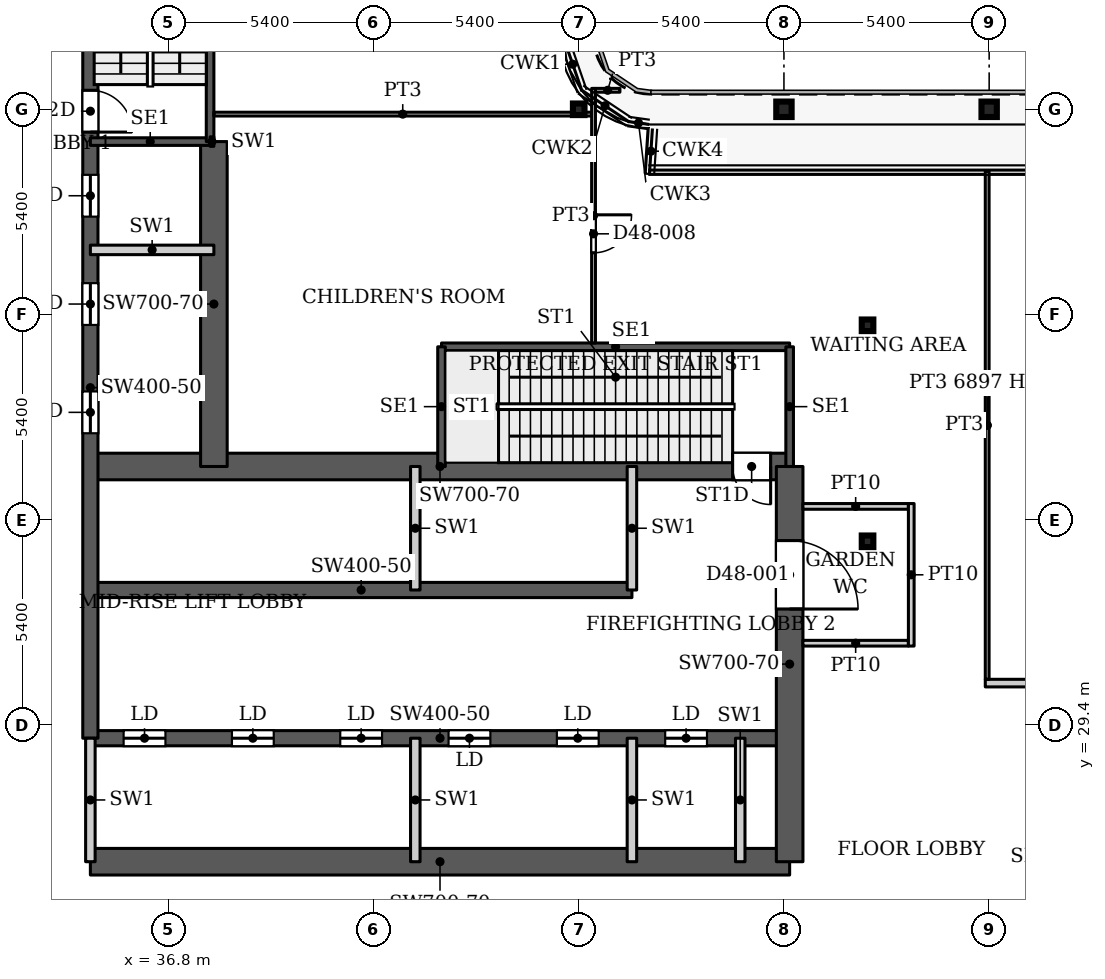
"""IFC4 building model, lengths in metres.
Left out: names, types, materials, properties, quantities, classifications, styles, units other than length and angle.
Written with IfcOpenShell. Run it as: python <this file> out.ifc"""

import sys

from ifc_helpers import new_model, si_unit, direction, frame, frame_2d, origin, origin_2d, place, context, subcontext, project, spatial, rectangle, hollow_rectangle, i_section, extrude, source, transform, mapped, element, fill, save


model = new_model("IFC4")
c1 = context("Model", 3, precision=1e-05, world=origin(), true_north=direction((0.0, 1.0)))
c2 = subcontext(c1, "Body", "Model", "MODEL_VIEW")
j1 = project(units=[si_unit("LENGTHUNIT", "METRE"), si_unit("PLANEANGLEUNIT", "RADIAN")], contexts=[c1])
p1 = place(None, origin())
s1 = spatial("IfcSite", under=j1, at=p1, CompositionType="ELEMENT")
p2 = place(p1, origin())
s2 = spatial("IfcBuilding", under=s1, at=p2, CompositionType="ELEMENT")
p3 = place(p2, frame((0.0, 0.0, 203.3)))
s3 = spatial("IfcBuildingStorey", under=s2, at=p3, CompositionType="ELEMENT", Elevation=203.3)
for number, where, z_axis, x_axis in (
    (1, (53.0, 45.6, 0.0), (0.0, 0.0, 1.0), (1.0, 0.0, 0.0)),
    (2, (58.4, 45.6, 0.0), (0.0, 0.0, 1.0), (1.0, 0.0, 0.0)),
):
    element("IfcColumn", number, at=place(p3, frame(where, z_axis=z_axis, x_axis=x_axis)), inside=s3, PredefinedType="COLUMN", context=c2, shape_type="SweptSolid", body=[
        extrude(i_section(OverallWidth=0.404, OverallDepth=0.407, WebThickness=0.027, FlangeThickness=0.044, FilletRadius=0.012, at=origin_2d()), origin(), (0.0, 0.0, 1.0), 7.8),
    ])
for number, where, z_axis, x_axis in (
    (3, (55.2, 34.232, 0.0), (0.0, 0.0, 1.0), (1.0, 0.0, 0.0)),
    (4, (55.2, 39.916, 0.0), (0.0, 0.0, 1.0), (1.0, 0.0, 0.0)),
    (5, (47.6, 45.6, 0.0), (0.0, 0.0, 1.0), (1.0, 0.0, 0.0)),
):
    element("IfcColumn", number, at=place(p3, frame(where, z_axis=z_axis, x_axis=x_axis)), inside=s3, PredefinedType="COLUMN", context=c2, shape_type="SweptSolid", body=[
        extrude(hollow_rectangle(XDim=0.305, YDim=0.305, WallThickness=0.016, InnerFilletRadius=0.016, OuterFilletRadius=0.032, at=origin_2d()), origin(), (0.0, 0.0, 1.0), 7.8),
    ])
p4 = place(p3, frame((34.75, 25.8, 0.0), z_axis=(0.0, 0.0, 1.0), x_axis=(1.0, 0.0, 0.0)))
e6 = element("IfcWall", 6, at=p4, inside=s3, PredefinedType="SHEAR", context=c2, shape_type="SweptSolid", body=[
    extrude(rectangle(XDim=18.4, YDim=0.7, at=frame_2d((9.2, 0.0))), origin(), (0.0, 0.0, 1.0), 7.8),
])
p5 = place(p3, frame((34.75, 29.05, 0.0), z_axis=(0.0, 0.0, 1.0), x_axis=(1.0, 0.0, 0.0)))
e7 = element("IfcWall", 7, at=p5, inside=s3, PredefinedType="SHEAR", context=c2, shape_type="SweptSolid", body=[
    extrude(rectangle(XDim=18.4, YDim=0.4, at=frame_2d((9.2, 0.0))), origin(), (0.0, 0.0, 1.0), 7.8),
])
p6 = place(p5, frame((0.875, 0.0, 0.0)))
e8 = element("IfcOpeningElement", 8, at=p6, cuts=e7, PredefinedType="OPENING", context=c2, shape_type="SweptSolid", body=[
    extrude(rectangle(XDim=1.1, YDim=2.2, at=frame_2d((0.55, 1.1))), frame((0.0, 0.21, 0.0), z_axis=(0.0, -1.0, 0.0), x_axis=(1.0, 0.0, 0.0)), (0.0, 0.0, 1.0), 0.42),
])
p7 = place(p5, frame((3.725, 0.0, 0.0)))
e9 = element("IfcOpeningElement", 9, at=p7, cuts=e7, PredefinedType="OPENING", context=c2, shape_type="SweptSolid", body=[
    extrude(rectangle(XDim=1.1, YDim=2.2, at=frame_2d((0.55, 1.1))), frame((0.0, 0.21, 0.0), z_axis=(0.0, -1.0, 0.0), x_axis=(1.0, 0.0, 0.0)), (0.0, 0.0, 1.0), 0.42),
])
p8 = place(p5, frame((6.575, 0.0, 0.0)))
e10 = element("IfcOpeningElement", 10, at=p8, cuts=e7, PredefinedType="OPENING", context=c2, shape_type="SweptSolid", body=[
    extrude(rectangle(XDim=1.1, YDim=2.2, at=frame_2d((0.55, 1.1))), frame((0.0, 0.21, 0.0), z_axis=(0.0, -1.0, 0.0), x_axis=(1.0, 0.0, 0.0)), (0.0, 0.0, 1.0), 0.42),
])
p9 = place(p5, frame((9.425, 0.0, 0.0)))
e11 = element("IfcOpeningElement", 11, at=p9, cuts=e7, PredefinedType="OPENING", context=c2, shape_type="SweptSolid", body=[
    extrude(rectangle(XDim=1.1, YDim=2.2, at=frame_2d((0.55, 1.1))), frame((0.0, 0.21, 0.0), z_axis=(0.0, -1.0, 0.0), x_axis=(1.0, 0.0, 0.0)), (0.0, 0.0, 1.0), 0.42),
])
p10 = place(p5, frame((12.275, 0.0, 0.0)))
e12 = element("IfcOpeningElement", 12, at=p10, cuts=e7, PredefinedType="OPENING", context=c2, shape_type="SweptSolid", body=[
    extrude(rectangle(XDim=1.1, YDim=2.2, at=frame_2d((0.55, 1.1))), frame((0.0, 0.21, 0.0), z_axis=(0.0, -1.0, 0.0), x_axis=(1.0, 0.0, 0.0)), (0.0, 0.0, 1.0), 0.42),
])
p11 = place(p5, frame((15.125, 0.0, 0.0)))
e13 = element("IfcOpeningElement", 13, at=p11, cuts=e7, PredefinedType="OPENING", context=c2, shape_type="SweptSolid", body=[
    extrude(rectangle(XDim=1.1, YDim=2.2, at=frame_2d((0.55, 1.1))), frame((0.0, 0.21, 0.0), z_axis=(0.0, -1.0, 0.0), x_axis=(1.0, 0.0, 0.0)), (0.0, 0.0, 1.0), 0.42),
])
p12 = place(p3, frame((34.75, 32.95, 0.0), z_axis=(0.0, 0.0, 1.0), x_axis=(1.0, 0.0, 0.0)))
e14 = element("IfcWall", 14, at=p12, inside=s3, PredefinedType="SHEAR", context=c2, shape_type="SweptSolid", body=[
    extrude(rectangle(XDim=14.25, YDim=0.4, at=frame_2d((7.125, 0.0))), origin(), (0.0, 0.0, 1.0), 7.8),
])
p13 = place(p3, frame((34.75, 36.2, 0.0), z_axis=(0.0, 0.0, 1.0), x_axis=(1.0, 0.0, 0.0)))
e15 = element("IfcWall", 15, at=p13, inside=s3, PredefinedType="SHEAR", context=c2, shape_type="SweptSolid", body=[
    extrude(rectangle(XDim=18.4, YDim=0.7, at=frame_2d((9.2, 0.0))), origin(), (0.0, 0.0, 1.0), 7.8),
])
p14 = place(p13, frame((16.9, 0.0, 0.0)))
e16 = element("IfcOpeningElement", 16, at=p14, cuts=e15, PredefinedType="OPENING", context=c2, shape_type="SweptSolid", body=[
    extrude(rectangle(XDim=1.0, YDim=2.2, at=frame_2d((0.5, 1.1))), frame((0.0, 0.36, 0.0), z_axis=(0.0, -1.0, 0.0), x_axis=(1.0, 0.0, 0.0)), (0.0, 0.0, 1.0), 0.72),
])
p15 = place(p3, frame((34.75, 29.05, 0.0), z_axis=(0.0, 0.0, 1.0), x_axis=(0.0, 1.0, 0.0)))
e17 = element("IfcWall", 17, at=p15, inside=s3, PredefinedType="SHEAR", context=c2, shape_type="SweptSolid", body=[
    extrude(rectangle(XDim=18.45, YDim=0.4, at=frame_2d((9.225, 0.0))), origin(), (0.0, 0.0, 1.0), 7.8),
])
p16 = place(p15, frame((8.025, 0.0, 0.0)))
e18 = element("IfcOpeningElement", 18, at=p16, cuts=e17, PredefinedType="OPENING", context=c2, shape_type="SweptSolid", body=[
    extrude(rectangle(XDim=1.1, YDim=2.2, at=frame_2d((0.55, 1.1))), frame((0.0, 0.21, 0.0), z_axis=(0.0, -1.0, 0.0), x_axis=(1.0, 0.0, 0.0)), (0.0, 0.0, 1.0), 0.42),
])
p17 = place(p15, frame((10.875, 0.0, 0.0)))
e19 = element("IfcOpeningElement", 19, at=p17, cuts=e17, PredefinedType="OPENING", context=c2, shape_type="SweptSolid", body=[
    extrude(rectangle(XDim=1.1, YDim=2.2, at=frame_2d((0.55, 1.1))), frame((0.0, 0.21, 0.0), z_axis=(0.0, -1.0, 0.0), x_axis=(1.0, 0.0, 0.0)), (0.0, 0.0, 1.0), 0.42),
])
p18 = place(p15, frame((13.725, 0.0, 0.0)))
e20 = element("IfcOpeningElement", 20, at=p18, cuts=e17, PredefinedType="OPENING", context=c2, shape_type="SweptSolid", body=[
    extrude(rectangle(XDim=1.1, YDim=2.2, at=frame_2d((0.55, 1.1))), frame((0.0, 0.21, 0.0), z_axis=(0.0, -1.0, 0.0), x_axis=(1.0, 0.0, 0.0)), (0.0, 0.0, 1.0), 0.42),
])
p19 = place(p15, frame((15.95, 0.0, 0.0)))
e21 = element("IfcOpeningElement", 21, at=p19, cuts=e17, PredefinedType="OPENING", context=c2, shape_type="SweptSolid", body=[
    extrude(rectangle(XDim=1.1, YDim=2.2, at=frame_2d((0.55, 1.1))), frame((0.0, 0.21, 0.0), z_axis=(0.0, -1.0, 0.0), x_axis=(1.0, 0.0, 0.0)), (0.0, 0.0, 1.0), 0.42),
])
p20 = place(p3, frame((38.0, 36.2, 0.0), z_axis=(0.0, 0.0, 1.0), x_axis=(0.0, 1.0, 0.0)))
e22 = element("IfcWall", 22, at=p20, inside=s3, PredefinedType="SHEAR", context=c2, shape_type="SweptSolid", body=[
    extrude(rectangle(XDim=8.55, YDim=0.7, at=frame_2d((4.275, 0.0))), origin(), (0.0, 0.0, 1.0), 7.8),
])
p21 = place(p3, frame((53.15, 25.8, 0.0), z_axis=(0.0, 0.0, 1.0), x_axis=(0.0, 1.0, 0.0)))
e23 = element("IfcWall", 23, at=p21, inside=s3, PredefinedType="SHEAR", context=c2, shape_type="SweptSolid", body=[
    extrude(rectangle(XDim=10.4, YDim=0.7, at=frame_2d((5.2, 0.0))), origin(), (0.0, 0.0, 1.0), 7.8),
])
p22 = place(p21, frame((6.65, 0.0, 0.0)))
e24 = element("IfcOpeningElement", 24, at=p22, cuts=e23, PredefinedType="OPENING", context=c2, shape_type="SweptSolid", body=[
    extrude(rectangle(XDim=1.8, YDim=2.1, at=frame_2d((0.9, 1.05))), frame((0.0, 0.36, 0.0), z_axis=(0.0, -1.0, 0.0), x_axis=(1.0, 0.0, 0.0)), (0.0, 0.0, 1.0), 0.72),
])
p23 = place(p3, frame((43.99, 39.35, 0.0), z_axis=(0.0, 0.0, 1.0), x_axis=(1.0, 0.0, 0.0)))
e25 = element("IfcWall", 25, at=p23, inside=s3, PredefinedType="SHEAR", context=c2, shape_type="SweptSolid", body=[
    extrude(rectangle(XDim=9.16, YDim=0.2, at=frame_2d((4.58, 0.0))), origin(), (0.0, 0.0, 1.0), 7.8),
])
for number, where, z_axis, x_axis in (
    (26, (43.99, 36.2, 0.0), (0.0, 0.0, 1.0), (0.0, 1.0, 0.0)),
    (27, (53.15, 36.2, 0.0), (0.0, 0.0, 1.0), (0.0, 1.0, 0.0)),
):
    element("IfcWall", number, at=place(p3, frame(where, z_axis=z_axis, x_axis=x_axis)), inside=s3, PredefinedType="SHEAR", context=c2, shape_type="SweptSolid", body=[
        extrude(rectangle(XDim=3.15, YDim=0.2, at=frame_2d((1.575, 0.0))), origin(), (0.0, 0.0, 1.0), 7.8),
    ])
p24 = place(p3, frame((34.75, 44.75, 0.0), z_axis=(0.0, 0.0, 1.0), x_axis=(1.0, 0.0, 0.0)))
e28 = element("IfcWall", 28, at=p24, inside=s3, PredefinedType="SHEAR", context=c2, shape_type="SweptSolid", body=[
    extrude(rectangle(XDim=3.15, YDim=0.2, at=frame_2d((1.575, 0.0))), origin(), (0.0, 0.0, 1.0), 7.8),
])
p25 = place(p3, frame((37.9, 44.75, 0.0), z_axis=(0.0, 0.0, 1.0), x_axis=(0.0, 1.0, 0.0)))
e29 = element("IfcWall", 29, at=p25, inside=s3, PredefinedType="SHEAR", context=c2, shape_type="SweptSolid", body=[
    extrude(rectangle(XDim=9.16, YDim=0.2, at=frame_2d((4.58, 0.0))), origin(), (0.0, 0.0, 1.0), 7.8),
])
for number, where, z_axis, x_axis in (
    (30, (34.75, 25.8, 0.0), (0.0, 0.0, 1.0), (0.0, 1.0, 0.0)),
    (31, (43.3, 25.8, 0.0), (0.0, 0.0, 1.0), (0.0, 1.0, 0.0)),
    (32, (43.3, 32.95, 0.0), (0.0, 0.0, 1.0), (0.0, 1.0, 0.0)),
    (33, (49.0, 25.8, 0.0), (0.0, 0.0, 1.0), (0.0, 1.0, 0.0)),
    (34, (49.0, 32.95, 0.0), (0.0, 0.0, 1.0), (0.0, 1.0, 0.0)),
    (35, (51.85, 25.8, 0.0), (0.0, 0.0, 1.0), (0.0, 1.0, 0.0)),
    (36, (34.75, 41.9, 0.0), (0.0, 0.0, 1.0), (1.0, 0.0, 0.0)),
):
    element("IfcWall", number, at=place(p3, frame(where, z_axis=z_axis, x_axis=x_axis)), inside=s3, PredefinedType="PARTITIONING", context=c2, shape_type="SweptSolid", body=[
        extrude(rectangle(XDim=3.25, YDim=0.25, at=frame_2d((1.625, 0.0))), origin(), (0.0, 0.0, 1.0), 7.8),
    ])
p26 = place(p3, frame((37.9, 44.75, 0.0), z_axis=(0.0, 0.0, 1.0), x_axis=(1.0, 0.0, 0.0)))
e37 = element("IfcWall", 37, at=p26, inside=s3, PredefinedType="PARTITIONING", context=c2, shape_type="SweptSolid", body=[
    extrude(rectangle(XDim=0.1, YDim=0.25, at=frame_2d((0.05, 0.0))), origin(), (0.0, 0.0, 1.0), 7.8),
])
p27 = place(p3, frame((37.999, 45.473, 0.0), z_axis=(0.0, 0.0, 1.0), x_axis=(1.0, 0.0, 0.0)))
e38 = element("IfcWall", 38, at=p27, inside=s3, PredefinedType="PARTITIONING", context=c2, shape_type="SweptSolid", body=[
    extrude(rectangle(XDim=9.941, YDim=0.1, at=frame_2d((4.97, 0.0))), origin(), (0.0, 0.0, 1.0), 7.5),
])
p28 = place(p3, frame((47.99, 39.449, 0.0), z_axis=(0.0, 0.0, 1.0), x_axis=(0.0, 1.0, 0.0)))
e39 = element("IfcWall", 39, at=p28, inside=s3, PredefinedType="PARTITIONING", context=c2, shape_type="SweptSolid", body=[
    extrude(rectangle(XDim=6.701, YDim=0.1, at=frame_2d((3.351, 0.0))), origin(), (0.0, 0.0, 1.0), 7.5),
])
p29 = place(p28, frame((2.374, 0.0, 0.0)))
e40 = element("IfcOpeningElement", 40, at=p29, cuts=e39, PredefinedType="OPENING", context=c2, shape_type="SweptSolid", body=[
    extrude(rectangle(XDim=1.0, YDim=2.1, at=frame_2d((0.5, 1.05))), frame((0.0, 0.06, 0.0), z_axis=(0.0, -1.0, 0.0), x_axis=(1.0, 0.0, 0.0)), (0.0, 0.0, 1.0), 0.12),
])
p30 = place(p3, frame((48.04, 46.1, 0.0), z_axis=(0.0, 0.0, 1.0), x_axis=(1.0, 0.0, 0.0)))
e41 = element("IfcWall", 41, at=p30, inside=s3, PredefinedType="PARTITIONING", context=c2, shape_type="SweptSolid", body=[
    extrude(rectangle(XDim=0.644, YDim=0.1, at=frame_2d((0.322, 0.0))), origin(), (0.0, 0.0, 1.0), 7.5),
])
for number, where, z_axis, x_axis in (
    (42, (53.499, 31.55, 0.0), (0.0, 0.0, 1.0), (1.0, 0.0, 0.0)),
    (43, (53.499, 35.15, 0.0), (0.0, 0.0, 1.0), (1.0, 0.0, 0.0)),
):
    element("IfcWall", number, at=place(p3, frame(where, z_axis=z_axis, x_axis=x_axis)), inside=s3, PredefinedType="PARTITIONING", context=c2, shape_type="SweptSolid", body=[
        extrude(rectangle(XDim=2.776, YDim=0.15, at=frame_2d((1.388, 0.0))), origin(), (0.0, 0.0, 1.0), 7.5),
    ])
p31 = place(p3, frame((56.35, 31.475, 0.0), z_axis=(0.0, 0.0, 1.0), x_axis=(0.0, 1.0, 0.0)))
e44 = element("IfcWall", 44, at=p31, inside=s3, PredefinedType="PARTITIONING", context=c2, shape_type="SweptSolid", body=[
    extrude(rectangle(XDim=3.75, YDim=0.15, at=frame_2d((1.875, 0.0))), origin(), (0.0, 0.0, 1.0), 7.5),
])
p32 = place(p3, frame((58.298, 30.5, 0.0), z_axis=(0.0, 0.0, 1.0), x_axis=(1.0, 0.0, 0.0)))
e45 = element("IfcWall", 45, at=p32, inside=s3, PredefinedType="PARTITIONING", context=c2, shape_type="SweptSolid", body=[
    extrude(rectangle(XDim=39.802, YDim=0.2, at=frame_2d((19.901, 0.0))), origin(), (0.0, 0.0, 1.0), 7.5),
])
p33 = place(p32, frame((4.334, 0.0, 0.0)))
e46 = element("IfcOpeningElement", 46, at=p33, cuts=e45, PredefinedType="OPENING", context=c2, shape_type="SweptSolid", body=[
    extrude(rectangle(XDim=1.8, YDim=2.1, at=frame_2d((0.9, 1.05))), frame((0.0, 0.11, 0.0), z_axis=(0.0, -1.0, 0.0), x_axis=(1.0, 0.0, 0.0)), (0.0, 0.0, 1.0), 0.22),
])
p34 = place(p32, frame((14.692, 0.0, 0.0)))
e47 = element("IfcOpeningElement", 47, at=p34, cuts=e45, PredefinedType="OPENING", context=c2, shape_type="SweptSolid", body=[
    extrude(rectangle(XDim=1.8, YDim=2.1, at=frame_2d((0.9, 1.05))), frame((0.0, 0.11, 0.0), z_axis=(0.0, -1.0, 0.0), x_axis=(1.0, 0.0, 0.0)), (0.0, 0.0, 1.0), 0.22),
])
p35 = place(p32, frame((25.05, 0.0, 0.0)))
e48 = element("IfcOpeningElement", 48, at=p35, cuts=e45, PredefinedType="OPENING", context=c2, shape_type="SweptSolid", body=[
    extrude(rectangle(XDim=1.8, YDim=2.1, at=frame_2d((0.9, 1.05))), frame((0.0, 0.11, 0.0), z_axis=(0.0, -1.0, 0.0), x_axis=(1.0, 0.0, 0.0)), (0.0, 0.0, 1.0), 0.22),
])
p36 = place(p32, frame((35.618, 0.0, 0.0)))
e49 = element("IfcOpeningElement", 49, at=p36, cuts=e45, PredefinedType="OPENING", context=c2, shape_type="SweptSolid", body=[
    extrude(rectangle(XDim=1.8, YDim=2.1, at=frame_2d((0.9, 1.05))), frame((0.0, 0.11, 0.0), z_axis=(0.0, -1.0, 0.0), x_axis=(1.0, 0.0, 0.0)), (0.0, 0.0, 1.0), 0.22),
])
p37 = place(p3, frame((58.348, 30.6, 0.0), z_axis=(0.0, 0.0, 1.0), x_axis=(0.0, 1.0, 0.0)))
e50 = element("IfcWall", 50, at=p37, inside=s3, PredefinedType="PARTITIONING", context=c2, shape_type="SweptSolid", body=[
    extrude(rectangle(XDim=13.37, YDim=0.1, at=frame_2d((6.685, 0.0))), origin(), (0.0, 0.0, 1.0), 6.897),
])
m1 = source(origin(), c2, "Body", "SweptSolid", [
    extrude(rectangle(XDim=1.1, YDim=2.2, at=frame_2d((0.55, 1.1))), frame((0.0, 0.025, 0.0), z_axis=(0.0, -1.0, 0.0), x_axis=(1.0, 0.0, 0.0)), (0.0, 0.0, 1.0), 0.05),
])
p38 = place(p6, origin())
e51 = element("IfcDoor", 51, at=p38, inside=s3, OperationType="SLIDING_TO_LEFT", PredefinedType="DOOR", context=c2, shape_type="MappedRepresentation", body=[
    mapped(m1, transform((0.0, 0.0, 0.0), x_axis=(1.0, 0.0, 0.0), y_axis=(0.0, 1.0, 0.0), z_axis=(0.0, 0.0, 1.0), scale=1.0)),
])
fill(e8, e51)
p39 = place(p7, origin())
e52 = element("IfcDoor", 52, at=p39, inside=s3, OperationType="SLIDING_TO_LEFT", PredefinedType="DOOR", context=c2, shape_type="MappedRepresentation", body=[
    mapped(m1, transform((0.0, 0.0, 0.0), x_axis=(1.0, 0.0, 0.0), y_axis=(0.0, 1.0, 0.0), z_axis=(0.0, 0.0, 1.0), scale=1.0)),
])
fill(e9, e52)
p40 = place(p8, origin())
e53 = element("IfcDoor", 53, at=p40, inside=s3, OperationType="SLIDING_TO_LEFT", PredefinedType="DOOR", context=c2, shape_type="MappedRepresentation", body=[
    mapped(m1, transform((0.0, 0.0, 0.0), x_axis=(1.0, 0.0, 0.0), y_axis=(0.0, 1.0, 0.0), z_axis=(0.0, 0.0, 1.0), scale=1.0)),
])
fill(e10, e53)
p41 = place(p9, origin())
e54 = element("IfcDoor", 54, at=p41, inside=s3, OperationType="SLIDING_TO_LEFT", PredefinedType="DOOR", context=c2, shape_type="MappedRepresentation", body=[
    mapped(m1, transform((0.0, 0.0, 0.0), x_axis=(1.0, 0.0, 0.0), y_axis=(0.0, 1.0, 0.0), z_axis=(0.0, 0.0, 1.0), scale=1.0)),
])
fill(e11, e54)
p42 = place(p10, origin())
e55 = element("IfcDoor", 55, at=p42, inside=s3, OperationType="SLIDING_TO_LEFT", PredefinedType="DOOR", context=c2, shape_type="MappedRepresentation", body=[
    mapped(m1, transform((0.0, 0.0, 0.0), x_axis=(1.0, 0.0, 0.0), y_axis=(0.0, 1.0, 0.0), z_axis=(0.0, 0.0, 1.0), scale=1.0)),
])
fill(e12, e55)
p43 = place(p16, origin())
e56 = element("IfcDoor", 56, at=p43, inside=s3, OperationType="SLIDING_TO_LEFT", PredefinedType="DOOR", context=c2, shape_type="MappedRepresentation", body=[
    mapped(m1, transform((0.0, 0.0, 0.0), x_axis=(1.0, 0.0, 0.0), y_axis=(0.0, 1.0, 0.0), z_axis=(0.0, 0.0, 1.0), scale=1.0)),
])
fill(e18, e56)
p44 = place(p17, origin())
e57 = element("IfcDoor", 57, at=p44, inside=s3, OperationType="SLIDING_TO_LEFT", PredefinedType="DOOR", context=c2, shape_type="MappedRepresentation", body=[
    mapped(m1, transform((0.0, 0.0, 0.0), x_axis=(1.0, 0.0, 0.0), y_axis=(0.0, 1.0, 0.0), z_axis=(0.0, 0.0, 1.0), scale=1.0)),
])
fill(e19, e57)
p45 = place(p18, origin())
e58 = element("IfcDoor", 58, at=p45, inside=s3, OperationType="SLIDING_TO_LEFT", PredefinedType="DOOR", context=c2, shape_type="MappedRepresentation", body=[
    mapped(m1, transform((0.0, 0.0, 0.0), x_axis=(1.0, 0.0, 0.0), y_axis=(0.0, 1.0, 0.0), z_axis=(0.0, 0.0, 1.0), scale=1.0)),
])
fill(e20, e58)
p46 = place(p11, origin())
e59 = element("IfcDoor", 59, at=p46, inside=s3, OperationType="SLIDING_TO_LEFT", PredefinedType="DOOR", context=c2, shape_type="MappedRepresentation", body=[
    mapped(m1, transform((0.0, 0.0, 0.0), x_axis=(1.0, 0.0, 0.0), y_axis=(0.0, 1.0, 0.0), z_axis=(0.0, 0.0, 1.0), scale=1.0)),
])
fill(e13, e59)
m2 = source(origin(), c2, "Body", "SweptSolid", [
    extrude(rectangle(XDim=1.0, YDim=2.2, at=frame_2d((0.5, 1.1))), frame((0.0, 0.025, 0.0), z_axis=(0.0, -1.0, 0.0), x_axis=(1.0, 0.0, 0.0)), (0.0, 0.0, 1.0), 0.05),
])
p47 = place(p14, origin())
e60 = element("IfcDoor", 60, at=p47, inside=s3, OperationType="SINGLE_SWING_RIGHT", PredefinedType="DOOR", context=c2, shape_type="MappedRepresentation", body=[
    mapped(m2, transform((0.0, 0.0, 0.0), x_axis=(1.0, 0.0, 0.0), y_axis=(0.0, 1.0, 0.0), z_axis=(0.0, 0.0, 1.0), scale=1.0)),
])
fill(e16, e60)
m3 = source(origin(), c2, "Body", "SweptSolid", [
    extrude(rectangle(XDim=1.1, YDim=2.2, at=frame_2d((0.55, 1.1))), frame((0.0, 0.025, 0.0), z_axis=(0.0, -1.0, 0.0), x_axis=(1.0, 0.0, 0.0)), (0.0, 0.0, 1.0), 0.05),
])
p48 = place(p19, origin())
e61 = element("IfcDoor", 61, at=p48, inside=s3, OperationType="SINGLE_SWING_RIGHT", PredefinedType="DOOR", context=c2, shape_type="MappedRepresentation", body=[
    mapped(m3, transform((0.0, 0.0, 0.0), x_axis=(1.0, 0.0, 0.0), y_axis=(0.0, 1.0, 0.0), z_axis=(0.0, 0.0, 1.0), scale=1.0)),
])
fill(e21, e61)
m4 = source(origin(), c2, "Body", "SweptSolid", [
    extrude(rectangle(XDim=1.8, YDim=2.1, at=frame_2d((0.9, 1.05))), frame((0.0, 0.025, 0.0), z_axis=(0.0, -1.0, 0.0), x_axis=(1.0, 0.0, 0.0)), (0.0, 0.0, 1.0), 0.05),
])
p49 = place(p22, origin())
e62 = element("IfcDoor", 62, at=p49, inside=s3, OperationType="DOUBLE_DOOR_SINGLE_SWING", PredefinedType="DOOR", context=c2, shape_type="MappedRepresentation", body=[
    mapped(m4, transform((0.0, 0.0, 0.0), x_axis=(1.0, 0.0, 0.0), y_axis=(0.0, 1.0, 0.0), z_axis=(0.0, 0.0, 1.0), scale=1.0)),
])
fill(e24, e62)
m5 = source(origin(), c2, "Body", "SweptSolid", [
    extrude(rectangle(XDim=1.0, YDim=2.1, at=frame_2d((0.5, 1.05))), frame((0.0, 0.025, 0.0), z_axis=(0.0, -1.0, 0.0), x_axis=(1.0, 0.0, 0.0)), (0.0, 0.0, 1.0), 0.05),
])
p50 = place(p29, origin())
e63 = element("IfcDoor", 63, at=p50, inside=s3, OperationType="SINGLE_SWING_RIGHT", PredefinedType="DOOR", context=c2, shape_type="MappedRepresentation", body=[
    mapped(m5, transform((0.0, 0.0, 0.0), x_axis=(1.0, 0.0, 0.0), y_axis=(0.0, 1.0, 0.0), z_axis=(0.0, 0.0, 1.0), scale=1.0)),
])
fill(e40, e63)
save(model, sys.argv[1])
